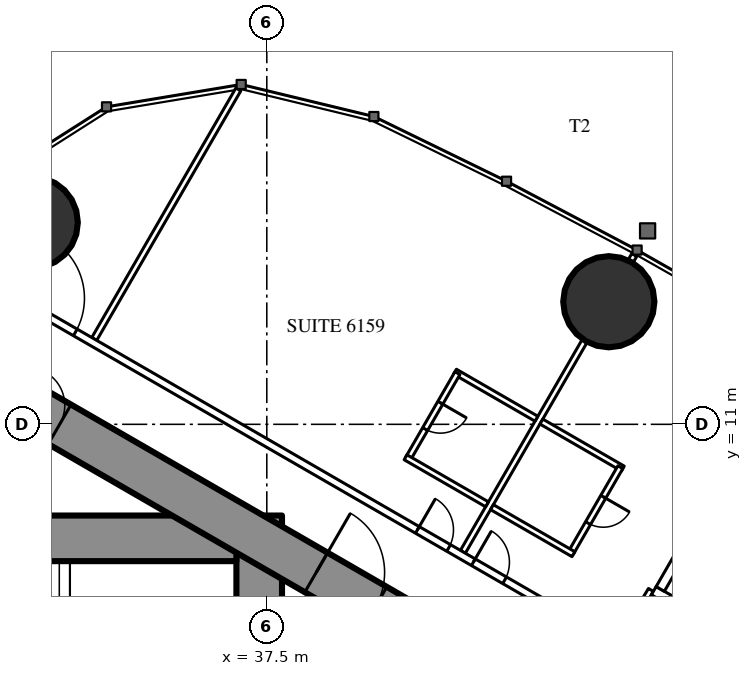
"""IFC4 building model, lengths in metres.
Left out: names, types, materials, properties, quantities, classifications, styles, units other than length and angle.
Written with IfcOpenShell. Run it as: python <this file> out.ifc"""

import sys

from ifc_helpers import new_model, si_unit, direction, frame, frame_2d, origin, origin_2d, place, context, subcontext, project, spatial, rectangle, circle, extrude, element, fill, save


model = new_model("IFC4")
c1 = context("Model", 3, precision=1e-05, world=origin(), true_north=direction((0.0, 1.0)))
c2 = subcontext(c1, "Body", "Model", "MODEL_VIEW")
j1 = project(units=[si_unit("LENGTHUNIT", "METRE"), si_unit("PLANEANGLEUNIT", "RADIAN")], contexts=[c1])
p1 = place(None, origin())
s1 = spatial("IfcSite", under=j1, at=p1, CompositionType="ELEMENT")
p2 = place(p1, origin())
s2 = spatial("IfcBuilding", under=s1, at=p2, CompositionType="ELEMENT")
p3 = place(p2, frame((0.0, 0.0, 229.7)))
s3 = spatial("IfcBuildingStorey", under=s2, at=p3, CompositionType="ELEMENT", Elevation=229.7)
for number, where, z_axis, x_axis in (
    (1, (31.328, 16.311, 0.0), (0.0, 0.0, 1.0), (1.0, 0.0, 0.0)),
    (2, (46.499, 14.226, 0.0), (0.0, 0.0, 1.0), (1.0, 0.0, 0.0)),
):
    element("IfcColumn", number, at=place(p3, frame(where, z_axis=z_axis, x_axis=x_axis)), inside=s3, PredefinedType="COLUMN", context=c2, shape_type="SweptSolid", body=[
        extrude(circle(Radius=1.2, at=origin_2d()), origin(), (0.0, 0.0, 1.0), 3.6),
    ])
p4 = place(p3, frame((37.3, -8.6, 0.0), z_axis=(0.0, 0.0, 1.0), x_axis=(0.0, 1.0, 0.0)))
e3 = element("IfcWall", 3, at=p4, inside=s3, PredefinedType="SHEAR", context=c2, shape_type="SweptSolid", body=[
    extrude(rectangle(XDim=17.2, YDim=1.2, at=frame_2d((8.6, 0.0))), origin(), (0.0, 0.0, 1.0), 3.6),
])
p5 = place(p4, frame((7.7, 0.0, 0.0)))
e4 = element("IfcOpeningElement", 4, at=p5, cuts=e3, PredefinedType="OPENING", context=c2, shape_type="SweptSolid", body=[
    extrude(rectangle(XDim=1.8, YDim=2.2, at=frame_2d((0.9, 1.1))), frame((0.0, 0.61, 0.0), z_axis=(0.0, -1.0, 0.0), x_axis=(1.0, 0.0, 0.0)), (0.0, 0.0, 1.0), 1.22),
])
p6 = place(p3, frame((28.3, 8.0, 0.0), z_axis=(0.0, 0.0, 1.0), x_axis=(1.0, 0.0, 0.0)))
e5 = element("IfcWall", 5, at=p6, inside=s3, PredefinedType="SHEAR", context=c2, shape_type="SweptSolid", body=[
    extrude(rectangle(XDim=8.4, YDim=1.2, at=frame_2d((4.2, 0.0))), origin(), (0.0, 0.0, 1.0), 3.6),
])
p7 = place(p6, frame((0.25, 0.0, 0.0)))
e6 = element("IfcOpeningElement", 6, at=p7, cuts=e5, PredefinedType="OPENING", context=c2, shape_type="SweptSolid", body=[
    extrude(rectangle(XDim=1.0, YDim=2.2, at=frame_2d((0.5, 1.1))), frame((0.0, 0.61, 0.0), z_axis=(0.0, -1.0, 0.0), x_axis=(1.0, 0.0, 0.0)), (0.0, 0.0, 1.0), 1.22),
])
p8 = place(p3, frame((27.2, 13.8, 0.0), z_axis=(0.0, 0.0, 1.0), x_axis=(0.866024515034, -0.500001539357, 0.0)))
e7 = element("IfcWall", 7, at=p8, inside=s3, PredefinedType="SHEAR", context=c2, shape_type="SweptSolid", body=[
    extrude(rectangle(XDim=26.907, YDim=1.2, at=frame_2d((13.454, 0.0))), origin(), (0.0, 0.0, 1.0), 3.6),
])
p9 = place(p8, frame((4.6, 0.0, 0.0)))
e8 = element("IfcOpeningElement", 8, at=p9, cuts=e7, PredefinedType="OPENING", context=c2, shape_type="SweptSolid", body=[
    extrude(rectangle(XDim=1.0, YDim=2.2, at=frame_2d((0.5, 1.1))), frame((0.0, 0.61, 0.0), z_axis=(0.0, -1.0, 0.0), x_axis=(1.0, 0.0, 0.0)), (0.0, 0.0, 1.0), 1.22),
])
p10 = place(p8, frame((13.395, 0.0, 0.0)))
e9 = element("IfcOpeningElement", 9, at=p10, cuts=e7, PredefinedType="OPENING", context=c2, shape_type="SweptSolid", body=[
    extrude(rectangle(XDim=1.8, YDim=2.2, at=frame_2d((0.9, 1.1))), frame((0.0, 0.61, 0.0), z_axis=(0.0, -1.0, 0.0), x_axis=(1.0, 0.0, 0.0)), (0.0, 0.0, 1.0), 1.22),
])
p11 = place(p3, frame((32.96, 13.246, 0.0), z_axis=(0.0, 0.0, 1.0), x_axis=(0.500000236886, 0.866025267018, 0.0)))
e10 = element("IfcWall", 10, at=p11, inside=s3, PredefinedType="PARTITIONING", context=c2, shape_type="SweptSolid", body=[
    extrude(rectangle(XDim=7.583, YDim=0.15, at=frame_2d((3.791, 0.0))), origin(), (0.0, 0.0, 1.0), 3.35),
])
p12 = place(p3, frame((42.66, 7.646, 0.0), z_axis=(0.0, 0.0, 1.0), x_axis=(0.499996592859, 0.866027370889, 0.0)))
e11 = element("IfcWall", 11, at=p12, inside=s3, PredefinedType="PARTITIONING", context=c2, shape_type="SweptSolid", body=[
    extrude(rectangle(XDim=6.398, YDim=0.15, at=frame_2d((3.199, 0.0))), origin(), (0.0, 0.0, 1.0), 2.45),
])
p13 = place(p3, frame((47.079, 15.3, 0.0), z_axis=(0.0, 0.0, 1.0), x_axis=(0.499212083968, 0.866479829667, 0.0)))
e12 = element("IfcWall", 12, at=p13, inside=s3, PredefinedType="PARTITIONING", context=c2, shape_type="SweptSolid", body=[
    extrude(rectangle(XDim=0.179, YDim=0.15, at=frame_2d((0.09, 0.0))), origin(), (0.0, 0.0, 1.0), 2.45),
])
p14 = place(p3, frame((28.959, 15.44, 0.0), z_axis=(0.0, 0.0, 1.0), x_axis=(0.866028936079, -0.499993881836, 0.0)))
e13 = element("IfcWall", 13, at=p14, inside=s3, PredefinedType="PARTITIONING", context=c2, shape_type="SweptSolid", body=[
    extrude(rectangle(XDim=20.503, YDim=0.2, at=frame_2d((10.251, 0.0))), origin(), (0.0, 0.0, 1.0), 3.35),
])
p15 = place(p14, frame((16.137, 0.0, 0.0)))
e14 = element("IfcOpeningElement", 14, at=p15, cuts=e13, PredefinedType="OPENING", context=c2, shape_type="SweptSolid", body=[
    extrude(rectangle(XDim=0.95, YDim=2.2, at=frame_2d((0.475, 1.1))), frame((0.0, 0.11, 0.0), z_axis=(0.0, -1.0, 0.0), x_axis=(1.0, 0.0, 0.0)), (0.0, 0.0, 1.0), 0.22),
])
p16 = place(p14, frame((14.437, 0.0, 0.0)))
e15 = element("IfcOpeningElement", 15, at=p16, cuts=e13, PredefinedType="OPENING", context=c2, shape_type="SweptSolid", body=[
    extrude(rectangle(XDim=0.95, YDim=2.2, at=frame_2d((0.475, 1.1))), frame((0.0, 0.11, 0.0), z_axis=(0.0, -1.0, 0.0), x_axis=(1.0, 0.0, 0.0)), (0.0, 0.0, 1.0), 0.22),
])
p17 = place(p14, frame((2.244, 0.0, 0.0)))
e16 = element("IfcOpeningElement", 16, at=p17, cuts=e13, PredefinedType="OPENING", context=c2, shape_type="SweptSolid", body=[
    extrude(rectangle(XDim=1.8, YDim=2.04, at=frame_2d((0.9, 1.02))), frame((0.0, 0.11, 0.0), z_axis=(0.0, -1.0, 0.0), x_axis=(1.0, 0.0, 0.0)), (0.0, 0.0, 1.0), 0.22),
])
p18 = place(p3, frame((47.606, 6.642, 0.0), z_axis=(0.0, 0.0, 1.0), x_axis=(-0.51353662755, -0.858067673418, 0.0)))
e17 = element("IfcWall", 17, at=p18, inside=s3, PredefinedType="PARTITIONING", context=c2, shape_type="SweptSolid", body=[
    extrude(rectangle(XDim=1.91, YDim=0.15, at=frame_2d((0.955, 0.0))), origin(), (0.0, 0.0, 1.0), 3.35),
])
p19 = place(p3, frame((44.725, 11.072, 0.0), z_axis=(0.0, 0.0, 1.0), x_axis=(0.866006523861, -0.500032699561, 0.0)))
e18 = element("IfcWall", 18, at=p19, inside=s3, PredefinedType="PARTITIONING", context=c2, shape_type="SweptSolid", body=[
    extrude(rectangle(XDim=2.475, YDim=0.15, at=frame_2d((1.237, 0.0))), origin(), (0.0, 0.0, 1.0), 3.35),
])
p20 = place(p3, frame((45.503, 7.621, 0.0), z_axis=(0.0, 0.0, 1.0), x_axis=(0.500006934395, 0.866021400173, 0.0)))
e19 = element("IfcWall", 19, at=p20, inside=s3, PredefinedType="PARTITIONING", context=c2, shape_type="SweptSolid", body=[
    extrude(rectangle(XDim=2.6, YDim=0.15, at=frame_2d((1.3, 0.0))), origin(), (0.0, 0.0, 1.0), 3.35),
])
p21 = place(p20, frame((0.9, 0.0, 0.0)))
e20 = element("IfcOpeningElement", 20, at=p21, cuts=e19, PredefinedType="OPENING", context=c2, shape_type="SweptSolid", body=[
    extrude(rectangle(XDim=0.8, YDim=2.2, at=frame_2d((0.4, 1.1))), frame((0.0, 0.085, 0.0), z_axis=(0.0, -1.0, 0.0), x_axis=(1.0, 0.0, 0.0)), (0.0, 0.0, 1.0), 0.17),
])
p22 = place(p3, frame((43.425, 8.821, 0.0), z_axis=(0.0, 0.0, 1.0), x_axis=(0.866006523861, -0.500032699561, 0.0)))
e21 = element("IfcWall", 21, at=p22, inside=s3, PredefinedType="PARTITIONING", context=c2, shape_type="SweptSolid", body=[
    extrude(rectangle(XDim=2.475, YDim=0.15, at=frame_2d((1.237, 0.0))), origin(), (0.0, 0.0, 1.0), 2.5),
])
p23 = place(p3, frame((42.451, 12.385, 0.0), z_axis=(0.0, 0.0, 1.0), x_axis=(0.866031185235, -0.4999899861, 0.0)))
e22 = element("IfcWall", 22, at=p23, inside=s3, PredefinedType="PARTITIONING", context=c2, shape_type="SweptSolid", body=[
    extrude(rectangle(XDim=2.475, YDim=0.15, at=frame_2d((1.238, 0.0))), origin(), (0.0, 0.0, 1.0), 3.35),
])
p24 = place(p3, frame((41.216, 10.095, 0.0), z_axis=(0.0, 0.0, 1.0), x_axis=(0.499936506574, 0.866062058628, 0.0)))
e23 = element("IfcWall", 23, at=p24, inside=s3, PredefinedType="PARTITIONING", context=c2, shape_type="SweptSolid", body=[
    extrude(rectangle(XDim=2.6, YDim=0.15, at=frame_2d((1.3, 0.0))), origin(), (0.0, 0.0, 1.0), 3.35),
])
p25 = place(p24, frame((0.9, 0.0, 0.0)))
e24 = element("IfcOpeningElement", 24, at=p25, cuts=e23, PredefinedType="OPENING", context=c2, shape_type="SweptSolid", body=[
    extrude(rectangle(XDim=0.8, YDim=2.2, at=frame_2d((0.4, 1.1))), frame((0.0, 0.085, 0.0), z_axis=(0.0, -1.0, 0.0), x_axis=(1.0, 0.0, 0.0)), (0.0, 0.0, 1.0), 0.17),
])
p26 = place(p3, frame((41.151, 10.133, 0.0), z_axis=(0.0, 0.0, 1.0), x_axis=(0.866006523861, -0.500032699561, 0.0)))
e25 = element("IfcWall", 25, at=p26, inside=s3, PredefinedType="PARTITIONING", context=c2, shape_type="SweptSolid", body=[
    extrude(rectangle(XDim=2.475, YDim=0.15, at=frame_2d((1.237, 0.0))), origin(), (0.0, 0.0, 1.0), 2.5),
])
p27 = place(p3, frame((47.681, 6.622, 0.0), z_axis=(0.0, 0.0, 1.0), x_axis=(0.86603344179, -0.499986077507, 0.0)))
e26 = element("IfcWall", 26, at=p27, inside=s3, PredefinedType="PARTITIONING", context=c2, shape_type="SweptSolid", body=[
    extrude(rectangle(XDim=6.6, YDim=0.25, at=frame_2d((3.3, 0.0))), origin(), (0.0, 0.0, 1.0), 3.35),
])
p28 = place(p27, frame((0.75, 0.0, 0.0)))
e27 = element("IfcOpeningElement", 27, at=p28, cuts=e26, PredefinedType="OPENING", context=c2, shape_type="SweptSolid", body=[
    extrude(rectangle(XDim=1.1, YDim=2.2, at=frame_2d((0.55, 1.1))), frame((0.0, 0.135, 0.0), z_axis=(0.0, -1.0, 0.0), x_axis=(1.0, 0.0, 0.0)), (0.0, 0.0, 1.0), 0.27),
])
p29 = place(p27, frame((2.75, 0.0, 0.0)))
e28 = element("IfcOpeningElement", 28, at=p29, cuts=e26, PredefinedType="OPENING", context=c2, shape_type="SweptSolid", body=[
    extrude(rectangle(XDim=1.1, YDim=2.2, at=frame_2d((0.55, 1.1))), frame((0.0, 0.135, 0.0), z_axis=(0.0, -1.0, 0.0), x_axis=(1.0, 0.0, 0.0)), (0.0, 0.0, 1.0), 0.27),
])
p30 = place(p27, frame((4.75, 0.0, 0.0)))
e29 = element("IfcOpeningElement", 29, at=p30, cuts=e26, PredefinedType="OPENING", context=c2, shape_type="SweptSolid", body=[
    extrude(rectangle(XDim=1.1, YDim=2.2, at=frame_2d((0.55, 1.1))), frame((0.0, 0.135, 0.0), z_axis=(0.0, -1.0, 0.0), x_axis=(1.0, 0.0, 0.0)), (0.0, 0.0, 1.0), 0.27),
])
p31 = place(p3, frame((47.852, 6.668, 0.0), z_axis=(0.0, 0.0, 1.0), x_axis=(0.499929347863, 0.866066190972, 0.0)))
e30 = element("IfcWall", 30, at=p31, inside=s3, PredefinedType="PARTITIONING", context=c2, shape_type="SweptSolid", body=[
    extrude(rectangle(XDim=3.201, YDim=0.25, at=frame_2d((1.6, 0.0))), origin(), (0.0, 0.0, 1.0), 3.35),
])
p32 = place(p21, origin())
e31 = element("IfcDoor", 31, at=p32, inside=s3, OperationType="SINGLE_SWING_RIGHT", PredefinedType="DOOR", context=c2, shape_type="SweptSolid", body=[
    extrude(rectangle(XDim=0.8, YDim=2.2, at=frame_2d((0.4, 1.1))), frame((0.0, 0.025, 0.0), z_axis=(0.0, -1.0, 0.0), x_axis=(1.0, 0.0, 0.0)), (0.0, 0.0, 1.0), 0.05),
])
fill(e20, e31)
p33 = place(p15, origin())
e32 = element("IfcDoor", 32, at=p33, inside=s3, OperationType="SINGLE_SWING_LEFT", PredefinedType="DOOR", context=c2, shape_type="SweptSolid", body=[
    extrude(rectangle(XDim=0.95, YDim=2.2, at=frame_2d((0.475, 1.1))), frame((0.0, 0.025, 0.0), z_axis=(0.0, -1.0, 0.0), x_axis=(1.0, 0.0, 0.0)), (0.0, 0.0, 1.0), 0.05),
])
fill(e14, e32)
p34 = place(p25, origin())
e33 = element("IfcDoor", 33, at=p34, inside=s3, OperationType="SINGLE_SWING_RIGHT", PredefinedType="DOOR", context=c2, shape_type="SweptSolid", body=[
    extrude(rectangle(XDim=0.8, YDim=2.2, at=frame_2d((0.4, 1.1))), frame((0.0, 0.025, 0.0), z_axis=(0.0, -1.0, 0.0), x_axis=(1.0, 0.0, 0.0)), (0.0, 0.0, 1.0), 0.05),
])
fill(e24, e33)
p35 = place(p16, origin())
e34 = element("IfcDoor", 34, at=p35, inside=s3, OperationType="SINGLE_SWING_LEFT", PredefinedType="DOOR", context=c2, shape_type="SweptSolid", body=[
    extrude(rectangle(XDim=0.95, YDim=2.2, at=frame_2d((0.475, 1.1))), frame((0.0, 0.025, 0.0), z_axis=(0.0, -1.0, 0.0), x_axis=(1.0, 0.0, 0.0)), (0.0, 0.0, 1.0), 0.05),
])
fill(e15, e34)
p36 = place(p17, origin())
e35 = element("IfcDoor", 35, at=p36, inside=s3, OperationType="DOUBLE_DOOR_SINGLE_SWING", PredefinedType="DOOR", context=c2, shape_type="SweptSolid", body=[
    extrude(rectangle(XDim=1.8, YDim=2.04, at=frame_2d((0.9, 1.02))), frame((0.0, 0.025, 0.0), z_axis=(0.0, -1.0, 0.0), x_axis=(1.0, 0.0, 0.0)), (0.0, 0.0, 1.0), 0.05),
])
fill(e16, e35)
p37 = place(p9, origin())
e36 = element("IfcDoor", 36, at=p37, inside=s3, OperationType="SINGLE_SWING_LEFT", PredefinedType="DOOR", context=c2, shape_type="SweptSolid", body=[
    extrude(rectangle(XDim=1.0, YDim=2.2, at=frame_2d((0.5, 1.1))), frame((0.0, 0.025, 0.0), z_axis=(0.0, -1.0, 0.0), x_axis=(1.0, 0.0, 0.0)), (0.0, 0.0, 1.0), 0.05),
])
fill(e8, e36)
p38 = place(p10, origin())
e37 = element("IfcDoor", 37, at=p38, inside=s3, OperationType="DOUBLE_DOOR_SINGLE_SWING", PredefinedType="DOOR", context=c2, shape_type="SweptSolid", body=[
    extrude(rectangle(XDim=1.8, YDim=2.2, at=frame_2d((0.9, 1.1))), frame((0.0, 0.025, 0.0), z_axis=(0.0, -1.0, 0.0), x_axis=(1.0, 0.0, 0.0)), (0.0, 0.0, 1.0), 0.05),
])
fill(e9, e37)
save(model, sys.argv[1])
